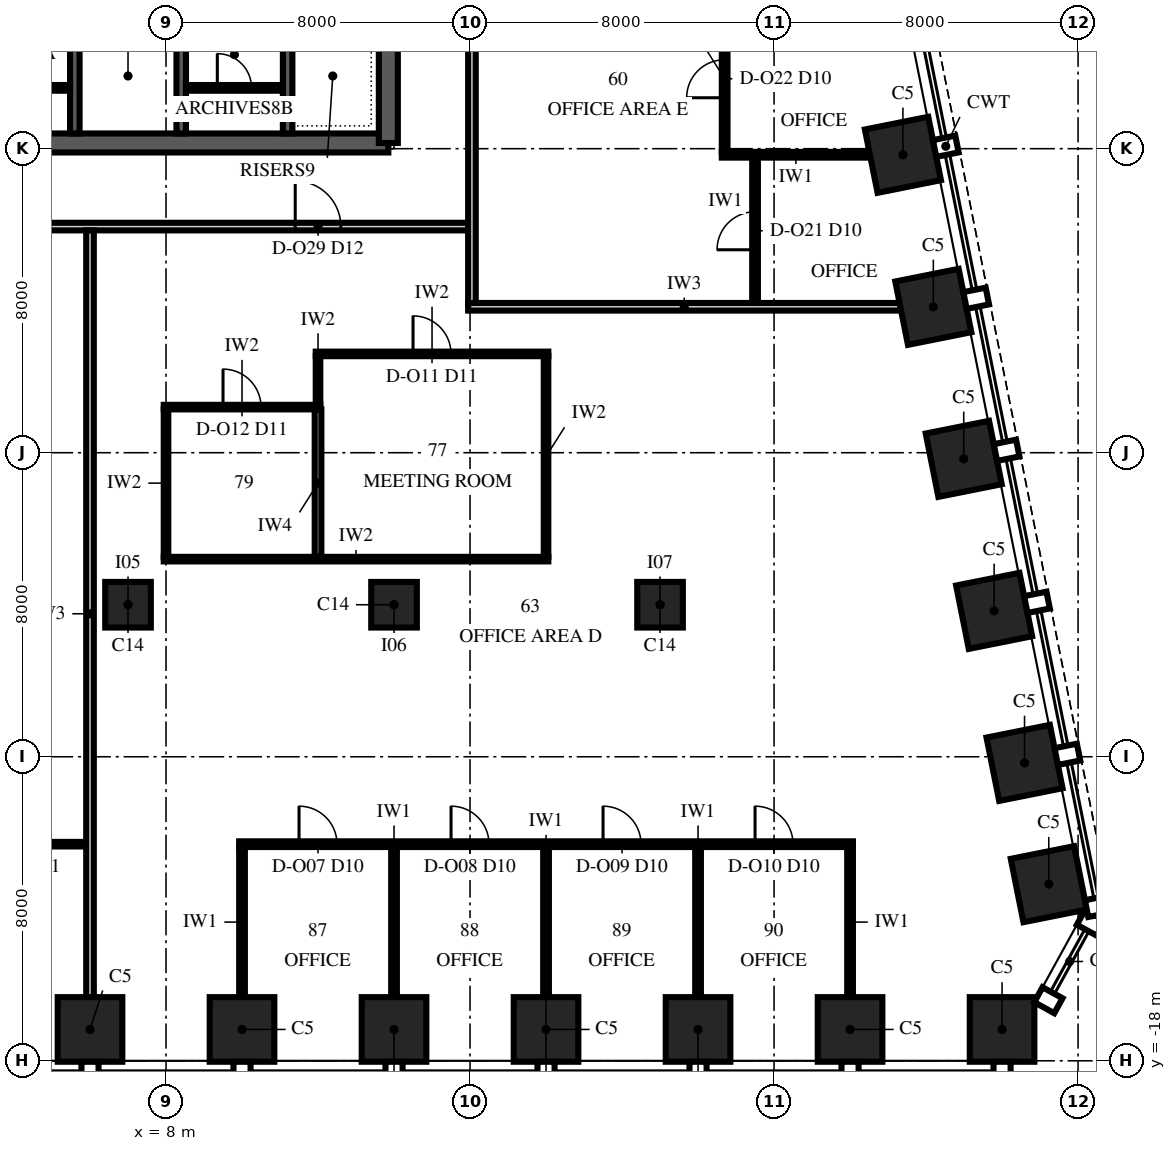
"""IFC4 building model, lengths in metres.
Left out: names, types, materials, properties, quantities, classifications, styles, units other than length and angle.
Written with IfcOpenShell. Run it as: python <this file> out.ifc"""

import sys

from ifc_helpers import new_model, si_unit, direction, frame, frame_2d, origin, origin_2d, place, context, subcontext, project, spatial, polyline, rectangle, outline, extrude, element, fill, save


model = new_model("IFC4")
c1 = context("Model", 3, precision=1e-05, world=origin(), true_north=direction((0.0, 1.0)))
c2 = subcontext(c1, "Body", "Model", "MODEL_VIEW")
j1 = project(units=[si_unit("LENGTHUNIT", "METRE"), si_unit("PLANEANGLEUNIT", "RADIAN")], contexts=[c1])
p1 = place(None, origin())
s1 = spatial("IfcSite", under=j1, at=p1, CompositionType="ELEMENT")
p2 = place(p1, origin())
s2 = spatial("IfcBuilding", under=s1, at=p2, CompositionType="ELEMENT")
p3 = place(p2, frame((0.0, 0.0, 248.0)))
s3 = spatial("IfcBuildingStorey", under=s2, at=p3, CompositionType="ELEMENT", Elevation=248.0)
for number, where, z_axis, x_axis in (
    (1, (6.0, -17.175, 0.0), (0.0, 0.0, 1.0), (1.0, 0.0, 0.0)),
    (2, (10.0, -17.175, 0.0), (0.0, 0.0, 1.0), (1.0, 0.0, 0.0)),
    (3, (14.0, -17.175, 0.0), (0.0, 0.0, 1.0), (1.0, 0.0, 0.0)),
    (4, (18.0, -17.175, 0.0), (0.0, 0.0, 1.0), (1.0, 0.0, 0.0)),
    (5, (22.0, -17.175, 0.0), (0.0, 0.0, 1.0), (1.0, 0.0, 0.0)),
    (6, (26.0, -17.175, 0.0), (0.0, 0.0, 1.0), (1.0, 0.0, 0.0)),
    (7, (30.0, -17.175, 0.0), (0.0, 0.0, 1.0), (1.0, 0.0, 0.0)),
    (8, (31.229, -13.353, 0.0), (0.0, 0.0, 1.0), (-0.196, 0.981, 0.0)),
    (9, (30.591, -10.162, 0.0), (0.0, 0.0, 1.0), (-0.196, 0.981, 0.0)),
    (10, (29.791, -6.162, 0.0), (0.0, 0.0, 1.0), (-0.196, 0.981, 0.0)),
    (11, (28.991, -2.162, 0.0), (0.0, 0.0, 1.0), (-0.196, 0.981, 0.0)),
    (12, (28.191, 1.838, 0.0), (0.0, 0.0, 1.0), (-0.196, 0.981, 0.0)),
    (13, (27.391, 5.838, 0.0), (0.0, 0.0, 1.0), (-0.196, 0.981, 0.0)),
):
    element("IfcColumn", number, at=place(p3, frame(where, z_axis=z_axis, x_axis=x_axis)), inside=s3, PredefinedType="COLUMN", context=c2, shape_type="SweptSolid", body=[
        extrude(rectangle(XDim=1.7, YDim=1.7, at=origin_2d()), origin(), (0.0, 0.0, 1.0), 4.0),
    ])
for number, where, z_axis, x_axis in (
    (14, (7.0, -6.0, 0.0), (0.0, 0.0, 1.0), (1.0, 0.0, 0.0)),
    (15, (14.0, -6.0, 0.0), (0.0, 0.0, 1.0), (1.0, 0.0, 0.0)),
    (16, (21.0, -6.0, 0.0), (0.0, 0.0, 1.0), (1.0, 0.0, 0.0)),
):
    element("IfcColumn", number, at=place(p3, frame(where, z_axis=z_axis, x_axis=x_axis)), inside=s3, PredefinedType="COLUMN", context=c2, shape_type="SweptSolid", body=[
        extrude(rectangle(XDim=1.2, YDim=1.2, at=origin_2d()), origin(), (0.0, 0.0, 1.0), 4.0),
    ])
p4 = place(p3, frame((-13.85, 6.15, 0.0), z_axis=(0.0, 0.0, 1.0), x_axis=(1.0, 0.0, 0.0)))
e17 = element("IfcWall", 17, at=p4, inside=s3, PredefinedType="SHEAR", context=c2, shape_type="SweptSolid", body=[
    extrude(rectangle(XDim=27.7, YDim=0.5, at=frame_2d((13.85, 0.0))), origin(), (0.0, 0.0, 1.0), 4.0),
])
p5 = place(p3, frame((13.85, 6.15, 0.0), z_axis=(0.0, 0.0, 1.0), x_axis=(0.0, 1.0, 0.0)))
e18 = element("IfcWall", 18, at=p5, inside=s3, PredefinedType="SHEAR", context=c2, shape_type="SweptSolid", body=[
    extrude(outline(polyline([(0.0, -0.25), (17.7, -0.25), (17.7, 0.0), (17.45, 0.0), (17.45, 0.25), (0.25, 0.25), (0.25, 0.0), (0.0, 0.0), (0.0, -0.25)])), origin(), (0.0, 0.0, 1.0), 4.0),
])
p6 = place(p5, frame((4.15, 0.0, 0.0)))
e19 = element("IfcOpeningElement", 19, at=p6, cuts=e18, PredefinedType="OPENING", context=c2, shape_type="SweptSolid", body=[
    extrude(rectangle(XDim=1.8, YDim=2.4, at=frame_2d((0.9, 1.2))), frame((0.0, 0.265, 0.0), z_axis=(0.0, -1.0, 0.0), x_axis=(1.0, 0.0, 0.0)), (0.0, 0.0, 1.0), 0.53),
])
for number, where, z_axis, x_axis in (
    (20, (5.6, 6.4, 0.0), (0.0, 0.0, 1.0), (0.0, 1.0, 0.0)),
    (21, (8.4, 6.4, 0.0), (0.0, 0.0, 1.0), (0.0, 1.0, 0.0)),
    (22, (11.2, 6.4, 0.0), (0.0, 0.0, 1.0), (0.0, 1.0, 0.0)),
):
    element("IfcWall", number, at=place(p3, frame(where, z_axis=z_axis, x_axis=x_axis)), inside=s3, PredefinedType="SHEAR", context=c2, shape_type="SweptSolid", body=[
        extrude(rectangle(XDim=2.875, YDim=0.25, at=frame_2d((1.438, 0.0))), origin(), (0.0, 0.0, 1.0), 4.0),
    ])
p7 = place(p3, frame((2.925, 7.6, 0.0), z_axis=(0.0, 0.0, 1.0), x_axis=(1.0, 0.0, 0.0)))
e23 = element("IfcWall", 23, at=p7, inside=s3, PredefinedType="PARTITIONING", context=c2, shape_type="SweptSolid", body=[
    extrude(rectangle(XDim=2.55, YDim=0.15, at=frame_2d((1.275, 0.0))), origin(), (0.0, 0.0, 1.0), 3.85),
])
p8 = place(p7, frame((0.825, 0.0, 0.0)))
e24 = element("IfcOpeningElement", 24, at=p8, cuts=e23, PredefinedType="OPENING", context=c2, shape_type="SweptSolid", body=[
    extrude(rectangle(XDim=0.9, YDim=2.1, at=frame_2d((0.45, 1.05))), frame((0.0, 0.09, 0.0), z_axis=(0.0, -1.0, 0.0), x_axis=(1.0, 0.0, 0.0)), (0.0, 0.0, 1.0), 0.18),
])
p9 = place(p3, frame((8.525, 7.6, 0.0), z_axis=(0.0, 0.0, 1.0), x_axis=(1.0, 0.0, 0.0)))
e25 = element("IfcWall", 25, at=p9, inside=s3, PredefinedType="PARTITIONING", context=c2, shape_type="SweptSolid", body=[
    extrude(rectangle(XDim=2.55, YDim=0.15, at=frame_2d((1.275, 0.0))), origin(), (0.0, 0.0, 1.0), 3.85),
])
p10 = place(p9, frame((0.825, 0.0, 0.0)))
e26 = element("IfcOpeningElement", 26, at=p10, cuts=e25, PredefinedType="OPENING", context=c2, shape_type="SweptSolid", body=[
    extrude(rectangle(XDim=0.9, YDim=2.1, at=frame_2d((0.45, 1.05))), frame((0.0, 0.09, 0.0), z_axis=(0.0, -1.0, 0.0), x_axis=(1.0, 0.0, 0.0)), (0.0, 0.0, 1.0), 0.18),
])
p11 = place(p3, frame((2.0, -12.3, 0.0), z_axis=(0.0, 0.0, 1.0), x_axis=(1.0, 0.0, 0.0)))
e27 = element("IfcWall", 27, at=p11, inside=s3, PredefinedType="PARTITIONING", context=c2, shape_type="SweptSolid", body=[
    extrude(rectangle(XDim=3.9, YDim=0.12, at=frame_2d((1.95, 0.0))), origin(), (0.0, 0.0, 1.0), 3.23),
])
p12 = place(p11, frame((1.5, 0.0, 0.0)))
e28 = element("IfcOpeningElement", 28, at=p12, cuts=e27, PredefinedType="OPENING", context=c2, shape_type="SweptSolid", body=[
    extrude(rectangle(XDim=1.0, YDim=2.4, at=frame_2d((0.5, 1.2))), frame((0.0, 0.075, 0.0), z_axis=(0.0, -1.0, 0.0), x_axis=(1.0, 0.0, 0.0)), (0.0, 0.0, 1.0), 0.15),
])
p13 = place(p3, frame((9.925, -12.3, 0.0), z_axis=(0.0, 0.0, 1.0), x_axis=(1.0, 0.0, 0.0)))
e29 = element("IfcWall", 29, at=p13, inside=s3, PredefinedType="PARTITIONING", context=c2, shape_type="SweptSolid", body=[
    extrude(rectangle(XDim=16.15, YDim=0.15, at=frame_2d((8.075, 0.0))), origin(), (0.0, 0.0, 1.0), 3.23),
])
p14 = place(p13, frame((1.575, 0.0, 0.0)))
e30 = element("IfcOpeningElement", 30, at=p14, cuts=e29, PredefinedType="OPENING", context=c2, shape_type="SweptSolid", body=[
    extrude(rectangle(XDim=1.0, YDim=2.3, at=frame_2d((0.5, 1.15))), frame((0.0, 0.09, 0.0), z_axis=(0.0, -1.0, 0.0), x_axis=(1.0, 0.0, 0.0)), (0.0, 0.0, 1.0), 0.18),
])
p15 = place(p13, frame((5.575, 0.0, 0.0)))
e31 = element("IfcOpeningElement", 31, at=p15, cuts=e29, PredefinedType="OPENING", context=c2, shape_type="SweptSolid", body=[
    extrude(rectangle(XDim=1.0, YDim=2.3, at=frame_2d((0.5, 1.15))), frame((0.0, 0.09, 0.0), z_axis=(0.0, -1.0, 0.0), x_axis=(1.0, 0.0, 0.0)), (0.0, 0.0, 1.0), 0.18),
])
p16 = place(p13, frame((9.575, 0.0, 0.0)))
e32 = element("IfcOpeningElement", 32, at=p16, cuts=e29, PredefinedType="OPENING", context=c2, shape_type="SweptSolid", body=[
    extrude(rectangle(XDim=1.0, YDim=2.3, at=frame_2d((0.5, 1.15))), frame((0.0, 0.09, 0.0), z_axis=(0.0, -1.0, 0.0), x_axis=(1.0, 0.0, 0.0)), (0.0, 0.0, 1.0), 0.18),
])
p17 = place(p13, frame((13.575, 0.0, 0.0)))
e33 = element("IfcOpeningElement", 33, at=p17, cuts=e29, PredefinedType="OPENING", context=c2, shape_type="SweptSolid", body=[
    extrude(rectangle(XDim=1.0, YDim=2.3, at=frame_2d((0.5, 1.15))), frame((0.0, 0.09, 0.0), z_axis=(0.0, -1.0, 0.0), x_axis=(1.0, 0.0, 0.0)), (0.0, 0.0, 1.0), 0.18),
])
p18 = place(p3, frame((7.94, -4.8, 0.0), z_axis=(0.0, 0.0, 1.0), x_axis=(1.0, 0.0, 0.0)))
e34 = element("IfcWall", 34, at=p18, inside=s3, PredefinedType="PARTITIONING", context=c2, shape_type="SweptSolid", body=[
    extrude(rectangle(XDim=10.12, YDim=0.12, at=frame_2d((5.06, 0.0))), origin(), (0.0, 0.0, 1.0), 3.23),
])
p19 = place(p3, frame((7.94, -0.8, 0.0), z_axis=(0.0, 0.0, 1.0), x_axis=(1.0, 0.0, 0.0)))
e35 = element("IfcWall", 35, at=p19, inside=s3, PredefinedType="PARTITIONING", context=c2, shape_type="SweptSolid", body=[
    extrude(rectangle(XDim=4.12, YDim=0.12, at=frame_2d((2.06, 0.0))), origin(), (0.0, 0.0, 1.0), 3.23),
])
p20 = place(p19, frame((1.56, 0.0, 0.0)))
e36 = element("IfcOpeningElement", 36, at=p20, cuts=e35, PredefinedType="OPENING", context=c2, shape_type="SweptSolid", body=[
    extrude(rectangle(XDim=1.0, YDim=2.4, at=frame_2d((0.5, 1.2))), frame((0.0, 0.075, 0.0), z_axis=(0.0, -1.0, 0.0), x_axis=(1.0, 0.0, 0.0)), (0.0, 0.0, 1.0), 0.15),
])
p21 = place(p3, frame((11.94, 0.6, 0.0), z_axis=(0.0, 0.0, 1.0), x_axis=(1.0, 0.0, 0.0)))
e37 = element("IfcWall", 37, at=p21, inside=s3, PredefinedType="PARTITIONING", context=c2, shape_type="SweptSolid", body=[
    extrude(rectangle(XDim=6.12, YDim=0.12, at=frame_2d((3.06, 0.0))), origin(), (0.0, 0.0, 1.0), 3.23),
])
p22 = place(p21, frame((2.56, 0.0, 0.0)))
e38 = element("IfcOpeningElement", 38, at=p22, cuts=e37, PredefinedType="OPENING", context=c2, shape_type="SweptSolid", body=[
    extrude(rectangle(XDim=1.0, YDim=2.4, at=frame_2d((0.5, 1.2))), frame((0.0, 0.075, 0.0), z_axis=(0.0, -1.0, 0.0), x_axis=(1.0, 0.0, 0.0)), (0.0, 0.0, 1.0), 0.15),
])
p23 = place(p3, frame((15.95, 1.84, 0.0), z_axis=(0.0, 0.0, 1.0), x_axis=(1.0, 0.0, 0.0)))
e39 = element("IfcWall", 39, at=p23, inside=s3, PredefinedType="PARTITIONING", context=c2, shape_type="SweptSolid", body=[
    extrude(rectangle(XDim=11.374, YDim=0.2, at=frame_2d((5.687, 0.0))), origin(), (0.0, 0.0, 1.0), 3.23),
])
p24 = place(p3, frame((-15.95, 3.95, 0.0), z_axis=(0.0, 0.0, 1.0), x_axis=(1.0, 0.0, 0.0)))
e40 = element("IfcWall", 40, at=p24, inside=s3, PredefinedType="PARTITIONING", context=c2, shape_type="SweptSolid", body=[
    extrude(rectangle(XDim=31.9, YDim=0.2, at=frame_2d((15.95, 0.0))), origin(), (0.0, 0.0, 1.0), 3.23),
])
p25 = place(p24, frame((3.35, 0.0, 0.0)))
e41 = element("IfcOpeningElement", 41, at=p25, cuts=e40, PredefinedType="OPENING", context=c2, shape_type="SweptSolid", body=[
    extrude(rectangle(XDim=1.2, YDim=2.4, at=frame_2d((0.6, 1.2))), frame((0.0, 0.115, 0.0), z_axis=(0.0, -1.0, 0.0), x_axis=(1.0, 0.0, 0.0)), (0.0, 0.0, 1.0), 0.23),
])
p26 = place(p24, frame((27.35, 0.0, 0.0)))
e42 = element("IfcOpeningElement", 42, at=p26, cuts=e40, PredefinedType="OPENING", context=c2, shape_type="SweptSolid", body=[
    extrude(rectangle(XDim=1.2, YDim=2.4, at=frame_2d((0.6, 1.2))), frame((0.0, 0.115, 0.0), z_axis=(0.0, -1.0, 0.0), x_axis=(1.0, 0.0, 0.0)), (0.0, 0.0, 1.0), 0.23),
])
p27 = place(p24, frame((15.35, 0.0, 0.0)))
e43 = element("IfcOpeningElement", 43, at=p27, cuts=e40, PredefinedType="OPENING", context=c2, shape_type="SweptSolid", body=[
    extrude(rectangle(XDim=1.2, YDim=2.4, at=frame_2d((0.6, 1.2))), frame((0.0, 0.115, 0.0), z_axis=(0.0, -1.0, 0.0), x_axis=(1.0, 0.0, 0.0)), (0.0, 0.0, 1.0), 0.23),
])
p28 = place(p3, frame((22.625, 5.84, 0.0), z_axis=(0.0, 0.0, 1.0), x_axis=(1.0, 0.0, 0.0)))
e44 = element("IfcWall", 44, at=p28, inside=s3, PredefinedType="PARTITIONING", context=c2, shape_type="SweptSolid", body=[
    extrude(rectangle(XDim=3.899, YDim=0.15, at=frame_2d((1.949, 0.0))), origin(), (0.0, 0.0, 1.0), 2.842),
])
p29 = place(p3, frame((6.0, -16.325, 0.0), z_axis=(0.0, 0.0, 1.0), x_axis=(0.0, 1.0, 0.0)))
e45 = element("IfcWall", 45, at=p29, inside=s3, PredefinedType="PARTITIONING", context=c2, shape_type="SweptSolid", body=[
    extrude(rectangle(XDim=20.175, YDim=0.2, at=frame_2d((10.087, 0.0))), origin(), (0.0, 0.0, 1.0), 2.842),
])
p30 = place(p3, frame((8.0, -4.74, 0.0), z_axis=(0.0, 0.0, 1.0), x_axis=(0.0, 1.0, 0.0)))
e46 = element("IfcWall", 46, at=p30, inside=s3, PredefinedType="PARTITIONING", context=c2, shape_type="SweptSolid", body=[
    extrude(rectangle(XDim=3.88, YDim=0.12, at=frame_2d((1.94, 0.0))), origin(), (0.0, 0.0, 1.0), 3.85),
])
p31 = place(p3, frame((10.0, -16.325, 0.0), z_axis=(0.0, 0.0, 1.0), x_axis=(0.0, 1.0, 0.0)))
e47 = element("IfcWall", 47, at=p31, inside=s3, PredefinedType="PARTITIONING", context=c2, shape_type="SweptSolid", body=[
    extrude(rectangle(XDim=3.95, YDim=0.15, at=frame_2d((1.975, 0.0))), origin(), (0.0, 0.0, 1.0), 3.23),
])
p32 = place(p3, frame((12.0, -4.74, 0.0), z_axis=(0.0, 0.0, 1.0), x_axis=(0.0, 1.0, 0.0)))
e48 = element("IfcWall", 48, at=p32, inside=s3, PredefinedType="PARTITIONING", context=c2, shape_type="SweptSolid", body=[
    extrude(rectangle(XDim=3.88, YDim=0.175, at=frame_2d((1.94, 0.0))), origin(), (0.0, 0.0, 1.0), 3.85),
])
p33 = place(p3, frame((12.0, -0.74, 0.0), z_axis=(0.0, 0.0, 1.0), x_axis=(0.0, 1.0, 0.0)))
e49 = element("IfcWall", 49, at=p33, inside=s3, PredefinedType="PARTITIONING", context=c2, shape_type="SweptSolid", body=[
    extrude(rectangle(XDim=1.28, YDim=0.12, at=frame_2d((0.64, 0.0))), origin(), (0.0, 0.0, 1.0), 3.85),
])
p34 = place(p3, frame((14.0, -16.325, 0.0), z_axis=(0.0, 0.0, 1.0), x_axis=(0.0, 1.0, 0.0)))
e50 = element("IfcWall", 50, at=p34, inside=s3, PredefinedType="PARTITIONING", context=c2, shape_type="SweptSolid", body=[
    extrude(rectangle(XDim=3.95, YDim=0.15, at=frame_2d((1.975, 0.0))), origin(), (0.0, 0.0, 1.0), 3.23),
])
p35 = place(p3, frame((16.05, 1.94, 0.0), z_axis=(0.0, 0.0, 1.0), x_axis=(0.0, 1.0, 0.0)))
e51 = element("IfcWall", 51, at=p35, inside=s3, PredefinedType="PARTITIONING", context=c2, shape_type="SweptSolid", body=[
    extrude(rectangle(XDim=24.01, YDim=0.2, at=frame_2d((12.005, 0.0))), origin(), (0.0, 0.0, 1.0), 2.842),
])
p36 = place(p35, frame((8.46, 0.0, 0.0)))
e52 = element("IfcOpeningElement", 52, at=p36, cuts=e51, PredefinedType="OPENING", context=c2, shape_type="SweptSolid", body=[
    extrude(rectangle(XDim=1.2, YDim=2.4, at=frame_2d((0.6, 1.2))), frame((0.0, 0.115, 0.0), z_axis=(0.0, -1.0, 0.0), x_axis=(1.0, 0.0, 0.0)), (0.0, 0.0, 1.0), 0.23),
])
p37 = place(p3, frame((18.0, -16.325, 0.0), z_axis=(0.0, 0.0, 1.0), x_axis=(0.0, 1.0, 0.0)))
e53 = element("IfcWall", 53, at=p37, inside=s3, PredefinedType="PARTITIONING", context=c2, shape_type="SweptSolid", body=[
    extrude(rectangle(XDim=3.95, YDim=0.15, at=frame_2d((1.975, 0.0))), origin(), (0.0, 0.0, 1.0), 3.23),
])
p38 = place(p3, frame((18.0, -4.74, 0.0), z_axis=(0.0, 0.0, 1.0), x_axis=(0.0, 1.0, 0.0)))
e54 = element("IfcWall", 54, at=p38, inside=s3, PredefinedType="PARTITIONING", context=c2, shape_type="SweptSolid", body=[
    extrude(rectangle(XDim=5.28, YDim=0.12, at=frame_2d((2.64, 0.0))), origin(), (0.0, 0.0, 1.0), 3.23),
])
p39 = place(p3, frame((22.0, -16.325, 0.0), z_axis=(0.0, 0.0, 1.0), x_axis=(0.0, 1.0, 0.0)))
e55 = element("IfcWall", 55, at=p39, inside=s3, PredefinedType="PARTITIONING", context=c2, shape_type="SweptSolid", body=[
    extrude(rectangle(XDim=3.95, YDim=0.15, at=frame_2d((1.975, 0.0))), origin(), (0.0, 0.0, 1.0), 3.23),
])
p40 = place(p3, frame((22.7, 5.915, 0.0), z_axis=(0.0, 0.0, 1.0), x_axis=(0.0, 1.0, 0.0)))
e56 = element("IfcWall", 56, at=p40, inside=s3, PredefinedType="PARTITIONING", context=c2, shape_type="SweptSolid", body=[
    extrude(rectangle(XDim=3.85, YDim=0.15, at=frame_2d((1.925, 0.0))), origin(), (0.0, 0.0, 1.0), 2.842),
])
p41 = place(p40, frame((1.425, 0.0, 0.0)))
e57 = element("IfcOpeningElement", 57, at=p41, cuts=e56, PredefinedType="OPENING", context=c2, shape_type="SweptSolid", body=[
    extrude(rectangle(XDim=1.0, YDim=2.3, at=frame_2d((0.5, 1.15))), frame((0.0, 0.09, 0.0), z_axis=(0.0, -1.0, 0.0), x_axis=(1.0, 0.0, 0.0)), (0.0, 0.0, 1.0), 0.18),
])
p42 = place(p3, frame((23.5, 1.94, 0.0), z_axis=(0.0, 0.0, 1.0), x_axis=(0.0, 1.0, 0.0)))
e58 = element("IfcWall", 58, at=p42, inside=s3, PredefinedType="PARTITIONING", context=c2, shape_type="SweptSolid", body=[
    extrude(rectangle(XDim=3.825, YDim=0.15, at=frame_2d((1.913, 0.0))), origin(), (0.0, 0.0, 1.0), 3.85),
])
p43 = place(p42, frame((1.4, 0.0, 0.0)))
e59 = element("IfcOpeningElement", 59, at=p43, cuts=e58, PredefinedType="OPENING", context=c2, shape_type="SweptSolid", body=[
    extrude(rectangle(XDim=1.0, YDim=2.3, at=frame_2d((0.5, 1.15))), frame((0.0, 0.09, 0.0), z_axis=(0.0, -1.0, 0.0), x_axis=(1.0, 0.0, 0.0)), (0.0, 0.0, 1.0), 0.18),
])
p44 = place(p3, frame((26.0, -16.325, 0.0), z_axis=(0.0, 0.0, 1.0), x_axis=(0.0, 1.0, 0.0)))
e60 = element("IfcWall", 60, at=p44, inside=s3, PredefinedType="PARTITIONING", context=c2, shape_type="SweptSolid", body=[
    extrude(rectangle(XDim=3.95, YDim=0.15, at=frame_2d((1.975, 0.0))), origin(), (0.0, 0.0, 1.0), 3.23),
])
p45 = place(p10, origin())
e61 = element("IfcDoor", 61, at=p45, inside=s3, OperationType="SINGLE_SWING_LEFT", PredefinedType="DOOR", context=c2, shape_type="SweptSolid", body=[
    extrude(rectangle(XDim=0.9, YDim=2.1, at=frame_2d((0.45, 1.05))), frame((0.0, 0.075, 0.0), z_axis=(0.0, -1.0, 0.0), x_axis=(1.0, 0.0, 0.0)), (0.0, 0.0, 1.0), 0.149),
])
fill(e26, e61)
p46 = place(p14, origin())
e62 = element("IfcDoor", 62, at=p46, inside=s3, OperationType="SINGLE_SWING_LEFT", PredefinedType="DOOR", context=c2, shape_type="SweptSolid", body=[
    extrude(rectangle(XDim=1.0, YDim=2.3, at=frame_2d((0.5, 1.15))), frame((0.0, 0.075, 0.0), z_axis=(0.0, -1.0, 0.0), x_axis=(1.0, 0.0, 0.0)), (0.0, 0.0, 1.0), 0.149),
])
fill(e30, e62)
p47 = place(p15, origin())
e63 = element("IfcDoor", 63, at=p47, inside=s3, OperationType="SINGLE_SWING_LEFT", PredefinedType="DOOR", context=c2, shape_type="SweptSolid", body=[
    extrude(rectangle(XDim=1.0, YDim=2.3, at=frame_2d((0.5, 1.15))), frame((0.0, 0.075, 0.0), z_axis=(0.0, -1.0, 0.0), x_axis=(1.0, 0.0, 0.0)), (0.0, 0.0, 1.0), 0.149),
])
fill(e31, e63)
p48 = place(p16, origin())
e64 = element("IfcDoor", 64, at=p48, inside=s3, OperationType="SINGLE_SWING_LEFT", PredefinedType="DOOR", context=c2, shape_type="SweptSolid", body=[
    extrude(rectangle(XDim=1.0, YDim=2.3, at=frame_2d((0.5, 1.15))), frame((0.0, 0.075, 0.0), z_axis=(0.0, -1.0, 0.0), x_axis=(1.0, 0.0, 0.0)), (0.0, 0.0, 1.0), 0.149),
])
fill(e32, e64)
p49 = place(p17, origin())
e65 = element("IfcDoor", 65, at=p49, inside=s3, OperationType="SINGLE_SWING_LEFT", PredefinedType="DOOR", context=c2, shape_type="SweptSolid", body=[
    extrude(rectangle(XDim=1.0, YDim=2.3, at=frame_2d((0.5, 1.15))), frame((0.0, 0.075, 0.0), z_axis=(0.0, -1.0, 0.0), x_axis=(1.0, 0.0, 0.0)), (0.0, 0.0, 1.0), 0.149),
])
fill(e33, e65)
p50 = place(p22, origin())
e66 = element("IfcDoor", 66, at=p50, inside=s3, OperationType="SINGLE_SWING_RIGHT", PredefinedType="DOOR", context=c2, shape_type="SweptSolid", body=[
    extrude(rectangle(XDim=1.0, YDim=2.4, at=frame_2d((0.5, 1.2))), frame((0.0, 0.06, 0.0), z_axis=(0.0, -1.0, 0.0), x_axis=(1.0, 0.0, 0.0)), (0.0, 0.0, 1.0), 0.12),
])
fill(e38, e66)
p51 = place(p20, origin())
e67 = element("IfcDoor", 67, at=p51, inside=s3, OperationType="SINGLE_SWING_RIGHT", PredefinedType="DOOR", context=c2, shape_type="SweptSolid", body=[
    extrude(rectangle(XDim=1.0, YDim=2.4, at=frame_2d((0.5, 1.2))), frame((0.0, 0.06, 0.0), z_axis=(0.0, -1.0, 0.0), x_axis=(1.0, 0.0, 0.0)), (0.0, 0.0, 1.0), 0.12),
])
fill(e36, e67)
p52 = place(p43, origin())
e68 = element("IfcDoor", 68, at=p52, inside=s3, OperationType="SINGLE_SWING_LEFT", PredefinedType="DOOR", context=c2, shape_type="SweptSolid", body=[
    extrude(rectangle(XDim=1.0, YDim=2.3, at=frame_2d((0.5, 1.15))), frame((0.0, 0.075, 0.0), z_axis=(0.0, -1.0, 0.0), x_axis=(1.0, 0.0, 0.0)), (0.0, 0.0, 1.0), 0.149),
])
fill(e59, e68)
p53 = place(p41, origin())
e69 = element("IfcDoor", 69, at=p53, inside=s3, OperationType="SINGLE_SWING_LEFT", PredefinedType="DOOR", context=c2, shape_type="SweptSolid", body=[
    extrude(rectangle(XDim=1.0, YDim=2.3, at=frame_2d((0.5, 1.15))), frame((0.0, 0.075, 0.0), z_axis=(0.0, -1.0, 0.0), x_axis=(1.0, 0.0, 0.0)), (0.0, 0.0, 1.0), 0.149),
])
fill(e57, e69)
p54 = place(p26, origin())
e70 = element("IfcDoor", 70, at=p54, inside=s3, OperationType="SINGLE_SWING_LEFT", PredefinedType="DOOR", context=c2, shape_type="SweptSolid", body=[
    extrude(rectangle(XDim=1.2, YDim=2.4, at=frame_2d((0.6, 1.2))), frame((0.0, 0.1, 0.0), z_axis=(0.0, -1.0, 0.0), x_axis=(1.0, 0.0, 0.0)), (0.0, 0.0, 1.0), 0.199),
])
fill(e42, e70)
save(model, sys.argv[1])
